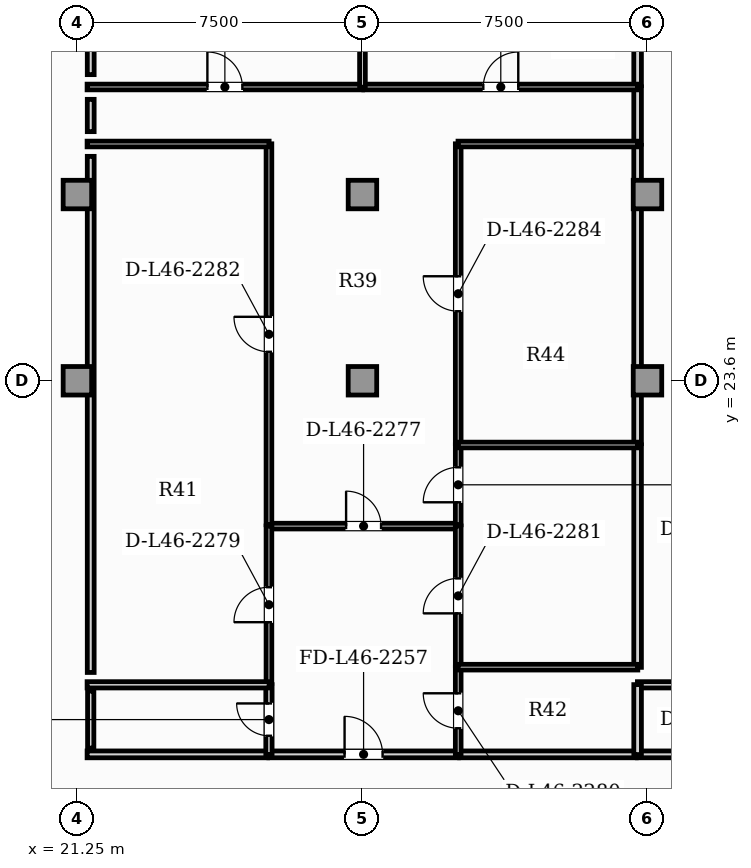
"""IFC4 building model, lengths in metres.
Left out: names, types, materials, properties, quantities, classifications, styles, units other than length and angle.
Written with IfcOpenShell. Run it as: python <this file> out.ifc"""

import sys

from ifc_helpers import new_model, si_unit, direction, frame, frame_2d, origin, origin_2d, place, context, subcontext, project, spatial, rectangle, extrude, element, fill, save


model = new_model("IFC4")
c1 = context("Model", 3, precision=1e-05, world=origin(), true_north=direction((0.0, 1.0)))
c2 = subcontext(c1, "Body", "Model", "MODEL_VIEW")
j1 = project(units=[si_unit("LENGTHUNIT", "METRE"), si_unit("PLANEANGLEUNIT", "RADIAN")], contexts=[c1])
p1 = place(None, origin())
s1 = spatial("IfcSite", under=j1, at=p1, CompositionType="ELEMENT")
p2 = place(p1, origin())
s2 = spatial("IfcBuilding", under=s1, at=p2, CompositionType="ELEMENT")
p3 = place(p2, frame((0.0, 0.0, 187.55)))
s3 = spatial("IfcBuildingStorey", under=s2, at=p3, CompositionType="ELEMENT", Elevation=187.55)
for number, where, z_axis, x_axis in (
    (1, (21.25, 23.6, 0.0), (0.0, 0.0, 1.0), (1.0, 0.0, 0.0)),
    (2, (28.75, 23.6, 0.0), (0.0, 0.0, 1.0), (1.0, 0.0, 0.0)),
    (3, (36.25, 23.6, 0.0), (0.0, 0.0, 1.0), (1.0, 0.0, 0.0)),
    (4, (21.25, 28.5, 0.0), (0.0, 0.0, 1.0), (1.0, 0.0, 0.0)),
    (5, (28.75, 28.5, 0.0), (0.0, 0.0, 1.0), (1.0, 0.0, 0.0)),
    (6, (36.25, 28.5, 0.0), (0.0, 0.0, 1.0), (1.0, 0.0, 0.0)),
):
    element("IfcColumn", number, at=place(p3, frame(where, z_axis=z_axis, x_axis=x_axis)), inside=s3, PredefinedType="COLUMN", context=c2, shape_type="SweptSolid", body=[
        extrude(rectangle(XDim=0.75, YDim=0.75, at=origin_2d()), origin(), (0.0, 0.0, 1.0), 5.05),
    ])
p4 = place(p3, frame((35.985, 13.77, 0.0), z_axis=(0.0, 0.0, 1.0), x_axis=(1.0, 0.0, 0.0)))
e7 = element("IfcWall", 7, at=p4, inside=s3, PredefinedType="PARTITIONING", context=c2, shape_type="SweptSolid", body=[
    extrude(rectangle(XDim=5.156, YDim=0.18, at=frame_2d((2.578, 0.0))), origin(), (0.0, 0.0, 1.0), 4.83),
])
p5 = place(p3, frame((26.285, 13.77, 0.0), z_axis=(0.0, 0.0, 1.0), x_axis=(1.0, 0.0, 0.0)))
e8 = element("IfcWall", 8, at=p5, inside=s3, PredefinedType="PARTITIONING", context=c2, shape_type="SweptSolid", body=[
    extrude(rectangle(XDim=4.99, YDim=0.18, at=frame_2d((2.495, 0.0))), origin(), (0.0, 0.0, 1.0), 4.83),
])
p6 = place(p5, frame((1.995, 0.0, 0.0)))
e9 = element("IfcOpeningElement", 9, at=p6, cuts=e8, PredefinedType="OPENING", context=c2, shape_type="SweptSolid", body=[
    extrude(rectangle(XDim=1.0, YDim=2.15, at=frame_2d((0.5, 1.075))), frame((0.0, 0.1, 0.0), z_axis=(0.0, -1.0, 0.0), x_axis=(1.0, 0.0, 0.0)), (0.0, 0.0, 1.0), 0.2),
])
p7 = place(p3, frame((21.505, 13.77, 0.0), z_axis=(0.0, 0.0, 1.0), x_axis=(1.0, 0.0, 0.0)))
e10 = element("IfcWall", 10, at=p7, inside=s3, PredefinedType="PARTITIONING", context=c2, shape_type="SweptSolid", body=[
    extrude(rectangle(XDim=4.75, YDim=0.18, at=frame_2d((2.375, 0.0))), origin(), (0.0, 0.0, 1.0), 4.83),
])
p8 = place(p3, frame((31.305, 13.77, 0.0), z_axis=(0.0, 0.0, 1.0), x_axis=(1.0, 0.0, 0.0)))
e11 = element("IfcWall", 11, at=p8, inside=s3, PredefinedType="PARTITIONING", context=c2, shape_type="SweptSolid", body=[
    extrude(rectangle(XDim=4.65, YDim=0.18, at=frame_2d((2.325, 0.0))), origin(), (0.0, 0.0, 1.0), 4.83),
])
p9 = place(p3, frame((35.985, 15.6, 0.0), z_axis=(0.0, 0.0, 1.0), x_axis=(1.0, 0.0, 0.0)))
e12 = element("IfcWall", 12, at=p9, inside=s3, PredefinedType="PLUMBINGWALL", context=c2, shape_type="SweptSolid", body=[
    extrude(rectangle(XDim=5.196, YDim=0.165, at=frame_2d((2.598, 0.0))), origin(), (0.0, 0.0, 1.0), 4.83),
])
p10 = place(p3, frame((35.99, 13.765, 0.0), z_axis=(0.0, 0.0, 1.0), x_axis=(0.0, 1.0, 0.0)))
e13 = element("IfcWall", 13, at=p10, inside=s3, PredefinedType="PARTITIONING", context=c2, shape_type="SweptSolid", body=[
    extrude(rectangle(XDim=1.84, YDim=0.2, at=frame_2d((0.92, 0.0))), origin(), (0.0, 0.0, 1.0), 4.83),
])
p11 = place(p3, frame((35.99, 29.825, 0.0), z_axis=(0.0, 0.0, 1.0), x_axis=(0.0, 1.0, 0.0)))
e14 = element("IfcWall", 14, at=p11, inside=s3, PredefinedType="PARTITIONING", context=c2, shape_type="SweptSolid", body=[
    extrude(rectangle(XDim=1.51, YDim=0.2, at=frame_2d((0.755, 0.0))), origin(), (0.0, 0.0, 1.0), 4.83),
])
p12 = place(p3, frame((35.99, 16.059, 0.0), z_axis=(0.0, 0.0, 1.0), x_axis=(0.0, 1.0, 0.0)))
e15 = element("IfcWall", 15, at=p12, inside=s3, PredefinedType="PARTITIONING", context=c2, shape_type="SweptSolid", body=[
    extrude(rectangle(XDim=5.855, YDim=0.2, at=frame_2d((2.928, 0.0))), origin(), (0.0, 0.0, 1.0), 4.83),
])
p13 = place(p3, frame((35.99, 21.945, 0.0), z_axis=(0.0, 0.0, 1.0), x_axis=(0.0, 1.0, 0.0)))
e16 = element("IfcWall", 16, at=p13, inside=s3, PredefinedType="PARTITIONING", context=c2, shape_type="SweptSolid", body=[
    extrude(rectangle(XDim=7.85, YDim=0.2, at=frame_2d((3.925, 0.0))), origin(), (0.0, 0.0, 1.0), 4.83),
])
p14 = place(p3, frame((35.99, 31.365, 0.0), z_axis=(0.0, 0.0, 1.0), x_axis=(0.0, 1.0, 0.0)))
e17 = element("IfcWall", 17, at=p14, inside=s3, PredefinedType="PARTITIONING", context=c2, shape_type="SweptSolid", body=[
    extrude(rectangle(XDim=2.1, YDim=0.2, at=frame_2d((1.05, 0.0))), origin(), (0.0, 0.0, 1.0), 4.83),
])
p15 = place(p3, frame((26.285, 19.776, 0.0), z_axis=(0.0, 0.0, 1.0), x_axis=(1.0, 0.0, 0.0)))
e18 = element("IfcWall", 18, at=p15, inside=s3, PredefinedType="PARTITIONING", context=c2, shape_type="SweptSolid", body=[
    extrude(rectangle(XDim=4.99, YDim=0.15, at=frame_2d((2.495, 0.0))), origin(), (0.0, 0.0, 1.0), 4.83),
])
p16 = place(p15, frame((2.035, 0.0, 0.0)))
e19 = element("IfcOpeningElement", 19, at=p16, cuts=e18, PredefinedType="OPENING", context=c2, shape_type="SweptSolid", body=[
    extrude(rectangle(XDim=0.92, YDim=2.1, at=frame_2d((0.46, 1.05))), frame((0.0, 0.085, 0.0), z_axis=(0.0, -1.0, 0.0), x_axis=(1.0, 0.0, 0.0)), (0.0, 0.0, 1.0), 0.17),
])
p17 = place(p3, frame((26.29, 13.765, 0.0), z_axis=(0.0, 0.0, 1.0), x_axis=(0.0, 1.0, 0.0)))
e20 = element("IfcWall", 20, at=p17, inside=s3, PredefinedType="PLUMBINGWALL", context=c2, shape_type="SweptSolid", body=[
    extrude(rectangle(XDim=1.84, YDim=0.165, at=frame_2d((0.92, 0.0))), origin(), (0.0, 0.0, 1.0), 4.83),
])
p18 = place(p17, frame((0.495, 0.0, 0.0)))
e21 = element("IfcOpeningElement", 21, at=p18, cuts=e20, PredefinedType="OPENING", context=c2, shape_type="SweptSolid", body=[
    extrude(rectangle(XDim=0.85, YDim=2.1, at=frame_2d((0.425, 1.05))), frame((0.0, 0.093, 0.0), z_axis=(0.0, -1.0, 0.0), x_axis=(1.0, 0.0, 0.0)), (0.0, 0.0, 1.0), 0.185),
])
p19 = place(p3, frame((26.29, 15.635, 0.0), z_axis=(0.0, 0.0, 1.0), x_axis=(0.0, 1.0, 0.0)))
e22 = element("IfcWall", 22, at=p19, inside=s3, PredefinedType="PARTITIONING", context=c2, shape_type="SweptSolid", body=[
    extrude(rectangle(XDim=4.146, YDim=0.15, at=frame_2d((2.073, 0.0))), origin(), (0.0, 0.0, 1.0), 4.83),
])
p20 = place(p19, frame((1.613, 0.0, 0.0)))
e23 = element("IfcOpeningElement", 23, at=p20, cuts=e22, PredefinedType="OPENING", context=c2, shape_type="SweptSolid", body=[
    extrude(rectangle(XDim=0.92, YDim=2.1, at=frame_2d((0.46, 1.05))), frame((0.0, 0.085, 0.0), z_axis=(0.0, -1.0, 0.0), x_axis=(1.0, 0.0, 0.0)), (0.0, 0.0, 1.0), 0.17),
])
p21 = place(p3, frame((31.27, 13.765, 0.0), z_axis=(0.0, 0.0, 1.0), x_axis=(0.0, 1.0, 0.0)))
e24 = element("IfcWall", 24, at=p21, inside=s3, PredefinedType="PARTITIONING", context=c2, shape_type="SweptSolid", body=[
    extrude(rectangle(XDim=2.304, YDim=0.15, at=frame_2d((1.152, 0.0))), origin(), (0.0, 0.0, 1.0), 4.83),
])
p22 = place(p21, frame((0.692, 0.0, 0.0)))
e25 = element("IfcOpeningElement", 25, at=p22, cuts=e24, PredefinedType="OPENING", context=c2, shape_type="SweptSolid", body=[
    extrude(rectangle(XDim=0.92, YDim=2.1, at=frame_2d((0.46, 1.05))), frame((0.0, 0.085, 0.0), z_axis=(0.0, -1.0, 0.0), x_axis=(1.0, 0.0, 0.0)), (0.0, 0.0, 1.0), 0.17),
])
p23 = place(p3, frame((31.27, 16.099, 0.0), z_axis=(0.0, 0.0, 1.0), x_axis=(0.0, 1.0, 0.0)))
e26 = element("IfcWall", 26, at=p23, inside=s3, PredefinedType="PARTITIONING", context=c2, shape_type="SweptSolid", body=[
    extrude(rectangle(XDim=3.681, YDim=0.15, at=frame_2d((1.841, 0.0))), origin(), (0.0, 0.0, 1.0), 4.83),
])
p24 = place(p23, frame((1.381, 0.0, 0.0)))
e27 = element("IfcOpeningElement", 27, at=p24, cuts=e26, PredefinedType="OPENING", context=c2, shape_type="SweptSolid", body=[
    extrude(rectangle(XDim=0.92, YDim=2.1, at=frame_2d((0.46, 1.05))), frame((0.0, 0.085, 0.0), z_axis=(0.0, -1.0, 0.0), x_axis=(1.0, 0.0, 0.0)), (0.0, 0.0, 1.0), 0.17),
])
p25 = place(p3, frame((26.29, 19.811, 0.0), z_axis=(0.0, 0.0, 1.0), x_axis=(0.0, 1.0, 0.0)))
e28 = element("IfcWall", 28, at=p25, inside=s3, PredefinedType="PARTITIONING", context=c2, shape_type="SweptSolid", body=[
    extrude(rectangle(XDim=10.024, YDim=0.15, at=frame_2d((5.012, 0.0))), origin(), (0.0, 0.0, 1.0), 4.83),
])
p26 = place(p25, frame((4.552, 0.0, 0.0)))
e29 = element("IfcOpeningElement", 29, at=p26, cuts=e28, PredefinedType="OPENING", context=c2, shape_type="SweptSolid", body=[
    extrude(rectangle(XDim=0.92, YDim=2.1, at=frame_2d((0.46, 1.05))), frame((0.0, 0.085, 0.0), z_axis=(0.0, -1.0, 0.0), x_axis=(1.0, 0.0, 0.0)), (0.0, 0.0, 1.0), 0.17),
])
p27 = place(p3, frame((21.505, 29.83, 0.0), z_axis=(0.0, 0.0, 1.0), x_axis=(1.0, 0.0, 0.0)))
e30 = element("IfcWall", 30, at=p27, inside=s3, PredefinedType="PARTITIONING", context=c2, shape_type="SweptSolid", body=[
    extrude(rectangle(XDim=4.79, YDim=0.15, at=frame_2d((2.395, 0.0))), origin(), (0.0, 0.0, 1.0), 4.83),
])
p28 = place(p3, frame((31.27, 19.811, 0.0), z_axis=(0.0, 0.0, 1.0), x_axis=(0.0, 1.0, 0.0)))
e31 = element("IfcWall", 31, at=p28, inside=s3, PredefinedType="PARTITIONING", context=c2, shape_type="SweptSolid", body=[
    extrude(rectangle(XDim=2.104, YDim=0.15, at=frame_2d((1.052, 0.0))), origin(), (0.0, 0.0, 1.0), 4.83),
])
p29 = place(p28, frame((0.592, 0.0, 0.0)))
e32 = element("IfcOpeningElement", 32, at=p29, cuts=e31, PredefinedType="OPENING", context=c2, shape_type="SweptSolid", body=[
    extrude(rectangle(XDim=0.92, YDim=2.1, at=frame_2d((0.46, 1.05))), frame((0.0, 0.085, 0.0), z_axis=(0.0, -1.0, 0.0), x_axis=(1.0, 0.0, 0.0)), (0.0, 0.0, 1.0), 0.17),
])
p30 = place(p3, frame((31.27, 21.945, 0.0), z_axis=(0.0, 0.0, 1.0), x_axis=(0.0, 1.0, 0.0)))
e33 = element("IfcWall", 33, at=p30, inside=s3, PredefinedType="PARTITIONING", context=c2, shape_type="SweptSolid", body=[
    extrude(rectangle(XDim=7.89, YDim=0.15, at=frame_2d((3.945, 0.0))), origin(), (0.0, 0.0, 1.0), 4.83),
])
p31 = place(p30, frame((3.485, 0.0, 0.0)))
e34 = element("IfcOpeningElement", 34, at=p31, cuts=e33, PredefinedType="OPENING", context=c2, shape_type="SweptSolid", body=[
    extrude(rectangle(XDim=0.92, YDim=2.1, at=frame_2d((0.46, 1.05))), frame((0.0, 0.085, 0.0), z_axis=(0.0, -1.0, 0.0), x_axis=(1.0, 0.0, 0.0)), (0.0, 0.0, 1.0), 0.17),
])
p32 = place(p3, frame((31.265, 29.83, 0.0), z_axis=(0.0, 0.0, 1.0), x_axis=(1.0, 0.0, 0.0)))
e35 = element("IfcWall", 35, at=p32, inside=s3, PredefinedType="PARTITIONING", context=c2, shape_type="SweptSolid", body=[
    extrude(rectangle(XDim=4.73, YDim=0.15, at=frame_2d((2.365, 0.0))), origin(), (0.0, 0.0, 1.0), 4.83),
])
p33 = place(p3, frame((21.505, 31.33, 0.0), z_axis=(0.0, 0.0, 1.0), x_axis=(1.0, 0.0, 0.0)))
e36 = element("IfcWall", 36, at=p33, inside=s3, PredefinedType="PARTITIONING", context=c2, shape_type="SweptSolid", body=[
    extrude(rectangle(XDim=7.25, YDim=0.15, at=frame_2d((3.625, 0.0))), origin(), (0.0, 0.0, 1.0), 4.83),
])
p34 = place(p33, frame((3.165, 0.0, 0.0)))
e37 = element("IfcOpeningElement", 37, at=p34, cuts=e36, PredefinedType="OPENING", context=c2, shape_type="SweptSolid", body=[
    extrude(rectangle(XDim=0.92, YDim=2.1, at=frame_2d((0.46, 1.05))), frame((0.0, 0.085, 0.0), z_axis=(0.0, -1.0, 0.0), x_axis=(1.0, 0.0, 0.0)), (0.0, 0.0, 1.0), 0.17),
])
p35 = place(p3, frame((28.785, 31.33, 0.0), z_axis=(0.0, 0.0, 1.0), x_axis=(1.0, 0.0, 0.0)))
e38 = element("IfcWall", 38, at=p35, inside=s3, PredefinedType="PARTITIONING", context=c2, shape_type="SweptSolid", body=[
    extrude(rectangle(XDim=7.21, YDim=0.15, at=frame_2d((3.605, 0.0))), origin(), (0.0, 0.0, 1.0), 4.83),
])
p36 = place(p35, frame((3.145, 0.0, 0.0)))
e39 = element("IfcOpeningElement", 39, at=p36, cuts=e38, PredefinedType="OPENING", context=c2, shape_type="SweptSolid", body=[
    extrude(rectangle(XDim=0.92, YDim=2.1, at=frame_2d((0.46, 1.05))), frame((0.0, 0.085, 0.0), z_axis=(0.0, -1.0, 0.0), x_axis=(1.0, 0.0, 0.0)), (0.0, 0.0, 1.0), 0.17),
])
p37 = place(p3, frame((21.505, 15.6, 0.0), z_axis=(0.0, 0.0, 1.0), x_axis=(1.0, 0.0, 0.0)))
e40 = element("IfcWall", 40, at=p37, inside=s3, PredefinedType="PLUMBINGWALL", context=c2, shape_type="SweptSolid", body=[
    extrude(rectangle(XDim=4.79, YDim=0.165, at=frame_2d((2.395, 0.0))), origin(), (0.0, 0.0, 1.0), 4.83),
])
for number, where, z_axis, x_axis in (
    (41, (31.265, 16.064, 0.0), (0.0, 0.0, 1.0), (1.0, 0.0, 0.0)),
    (42, (31.265, 21.91, 0.0), (0.0, 0.0, 1.0), (1.0, 0.0, 0.0)),
):
    element("IfcWall", number, at=place(p3, frame(where, z_axis=z_axis, x_axis=x_axis)), inside=s3, PredefinedType="PARTITIONING", context=c2, shape_type="SweptSolid", body=[
        extrude(rectangle(XDim=4.73, YDim=0.15, at=frame_2d((2.365, 0.0))), origin(), (0.0, 0.0, 1.0), 4.83),
    ])
p38 = place(p3, frame((28.75, 31.325, 0.0), z_axis=(0.0, 0.0, 1.0), x_axis=(0.0, 1.0, 0.0)))
e43 = element("IfcWall", 43, at=p38, inside=s3, PredefinedType="PARTITIONING", context=c2, shape_type="SweptSolid", body=[
    extrude(rectangle(XDim=5.153, YDim=0.15, at=frame_2d((2.576, 0.0))), origin(), (0.0, 0.0, 1.0), 4.424),
])
p39 = place(p3, frame((21.6, 30.155, 0.0), z_axis=(0.0, 0.0, 1.0), x_axis=(0.0, 1.0, 0.0)))
e44 = element("IfcWall", 44, at=p39, inside=s3, PredefinedType="PARTITIONING", context=c2, shape_type="SweptSolid", body=[
    extrude(rectangle(XDim=0.85, YDim=0.18, at=frame_2d((0.425, 0.0))), origin(), (0.0, 0.0, 1.0), 4.83),
])
p40 = place(p3, frame((21.6, 13.935, 0.0), z_axis=(0.0, 0.0, 1.0), x_axis=(0.0, 1.0, 0.0)))
e45 = element("IfcWall", 45, at=p40, inside=s3, PredefinedType="PLUMBINGWALL", context=c2, shape_type="SweptSolid", body=[
    extrude(rectangle(XDim=1.5, YDim=0.165, at=frame_2d((0.75, 0.0))), origin(), (0.0, 0.0, 1.0), 4.83),
])
p41 = place(p3, frame((21.6, 15.925, 0.0), z_axis=(0.0, 0.0, 1.0), x_axis=(0.0, 1.0, 0.0)))
e46 = element("IfcWall", 46, at=p41, inside=s3, PredefinedType="PARTITIONING", context=c2, shape_type="SweptSolid", body=[
    extrude(rectangle(XDim=13.58, YDim=0.18, at=frame_2d((6.79, 0.0))), origin(), (0.0, 0.0, 1.0), 4.83),
])
p42 = place(p3, frame((21.6, 31.655, 0.0), z_axis=(0.0, 0.0, 1.0), x_axis=(0.0, 1.0, 0.0)))
e47 = element("IfcWall", 47, at=p42, inside=s3, PredefinedType="PARTITIONING", context=c2, shape_type="SweptSolid", body=[
    extrude(rectangle(XDim=4.823, YDim=0.18, at=frame_2d((2.411, 0.0))), origin(), (0.0, 0.0, 1.0), 4.83),
])
p43 = place(p6, origin())
e48 = element("IfcDoor", 48, at=p43, inside=s3, OperationType="SINGLE_SWING_LEFT", PredefinedType="DOOR", context=c2, shape_type="SweptSolid", body=[
    extrude(rectangle(XDim=1.0, YDim=2.15, at=frame_2d((0.5, 1.075))), frame((0.0, 0.025, 0.0), z_axis=(0.0, -1.0, 0.0), x_axis=(1.0, 0.0, 0.0)), (0.0, 0.0, 1.0), 0.05),
])
fill(e9, e48)
p44 = place(p16, origin())
e49 = element("IfcDoor", 49, at=p44, inside=s3, OperationType="SINGLE_SWING_LEFT", PredefinedType="DOOR", context=c2, shape_type="SweptSolid", body=[
    extrude(rectangle(XDim=0.92, YDim=2.1, at=frame_2d((0.46, 1.05))), frame((0.0, 0.025, 0.0), z_axis=(0.0, -1.0, 0.0), x_axis=(1.0, 0.0, 0.0)), (0.0, 0.0, 1.0), 0.05),
])
fill(e19, e49)
p45 = place(p18, origin())
e50 = element("IfcDoor", 50, at=p45, inside=s3, OperationType="SINGLE_SWING_RIGHT", PredefinedType="DOOR", context=c2, shape_type="SweptSolid", body=[
    extrude(rectangle(XDim=0.85, YDim=2.1, at=frame_2d((0.425, 1.05))), frame((0.0, 0.025, 0.0), z_axis=(0.0, -1.0, 0.0), x_axis=(1.0, 0.0, 0.0)), (0.0, 0.0, 1.0), 0.05),
])
fill(e21, e50)
p46 = place(p20, origin())
e51 = element("IfcDoor", 51, at=p46, inside=s3, OperationType="SINGLE_SWING_LEFT", PredefinedType="DOOR", context=c2, shape_type="SweptSolid", body=[
    extrude(rectangle(XDim=0.92, YDim=2.1, at=frame_2d((0.46, 1.05))), frame((0.0, 0.025, 0.0), z_axis=(0.0, -1.0, 0.0), x_axis=(1.0, 0.0, 0.0)), (0.0, 0.0, 1.0), 0.05),
])
fill(e23, e51)
p47 = place(p22, origin())
e52 = element("IfcDoor", 52, at=p47, inside=s3, OperationType="SINGLE_SWING_RIGHT", PredefinedType="DOOR", context=c2, shape_type="SweptSolid", body=[
    extrude(rectangle(XDim=0.92, YDim=2.1, at=frame_2d((0.46, 1.05))), frame((0.0, 0.025, 0.0), z_axis=(0.0, -1.0, 0.0), x_axis=(1.0, 0.0, 0.0)), (0.0, 0.0, 1.0), 0.05),
])
fill(e25, e52)
p48 = place(p24, origin())
e53 = element("IfcDoor", 53, at=p48, inside=s3, OperationType="SINGLE_SWING_LEFT", PredefinedType="DOOR", context=c2, shape_type="SweptSolid", body=[
    extrude(rectangle(XDim=0.92, YDim=2.1, at=frame_2d((0.46, 1.05))), frame((0.0, 0.025, 0.0), z_axis=(0.0, -1.0, 0.0), x_axis=(1.0, 0.0, 0.0)), (0.0, 0.0, 1.0), 0.05),
])
fill(e27, e53)
p49 = place(p26, origin())
e54 = element("IfcDoor", 54, at=p49, inside=s3, OperationType="SINGLE_SWING_RIGHT", PredefinedType="DOOR", context=c2, shape_type="SweptSolid", body=[
    extrude(rectangle(XDim=0.92, YDim=2.1, at=frame_2d((0.46, 1.05))), frame((0.0, 0.025, 0.0), z_axis=(0.0, -1.0, 0.0), x_axis=(1.0, 0.0, 0.0)), (0.0, 0.0, 1.0), 0.05),
])
fill(e29, e54)
p50 = place(p29, origin())
e55 = element("IfcDoor", 55, at=p50, inside=s3, OperationType="SINGLE_SWING_LEFT", PredefinedType="DOOR", context=c2, shape_type="SweptSolid", body=[
    extrude(rectangle(XDim=0.92, YDim=2.1, at=frame_2d((0.46, 1.05))), frame((0.0, 0.025, 0.0), z_axis=(0.0, -1.0, 0.0), x_axis=(1.0, 0.0, 0.0)), (0.0, 0.0, 1.0), 0.05),
])
fill(e32, e55)
p51 = place(p31, origin())
e56 = element("IfcDoor", 56, at=p51, inside=s3, OperationType="SINGLE_SWING_RIGHT", PredefinedType="DOOR", context=c2, shape_type="SweptSolid", body=[
    extrude(rectangle(XDim=0.92, YDim=2.1, at=frame_2d((0.46, 1.05))), frame((0.0, 0.025, 0.0), z_axis=(0.0, -1.0, 0.0), x_axis=(1.0, 0.0, 0.0)), (0.0, 0.0, 1.0), 0.05),
])
fill(e34, e56)
p52 = place(p34, origin())
e57 = element("IfcDoor", 57, at=p52, inside=s3, OperationType="SINGLE_SWING_LEFT", PredefinedType="DOOR", context=c2, shape_type="SweptSolid", body=[
    extrude(rectangle(XDim=0.92, YDim=2.1, at=frame_2d((0.46, 1.05))), frame((0.0, 0.025, 0.0), z_axis=(0.0, -1.0, 0.0), x_axis=(1.0, 0.0, 0.0)), (0.0, 0.0, 1.0), 0.05),
])
fill(e37, e57)
p53 = place(p36, origin())
e58 = element("IfcDoor", 58, at=p53, inside=s3, OperationType="SINGLE_SWING_RIGHT", PredefinedType="DOOR", context=c2, shape_type="SweptSolid", body=[
    extrude(rectangle(XDim=0.92, YDim=2.1, at=frame_2d((0.46, 1.05))), frame((0.0, 0.025, 0.0), z_axis=(0.0, -1.0, 0.0), x_axis=(1.0, 0.0, 0.0)), (0.0, 0.0, 1.0), 0.05),
])
fill(e39, e58)
save(model, sys.argv[1])
